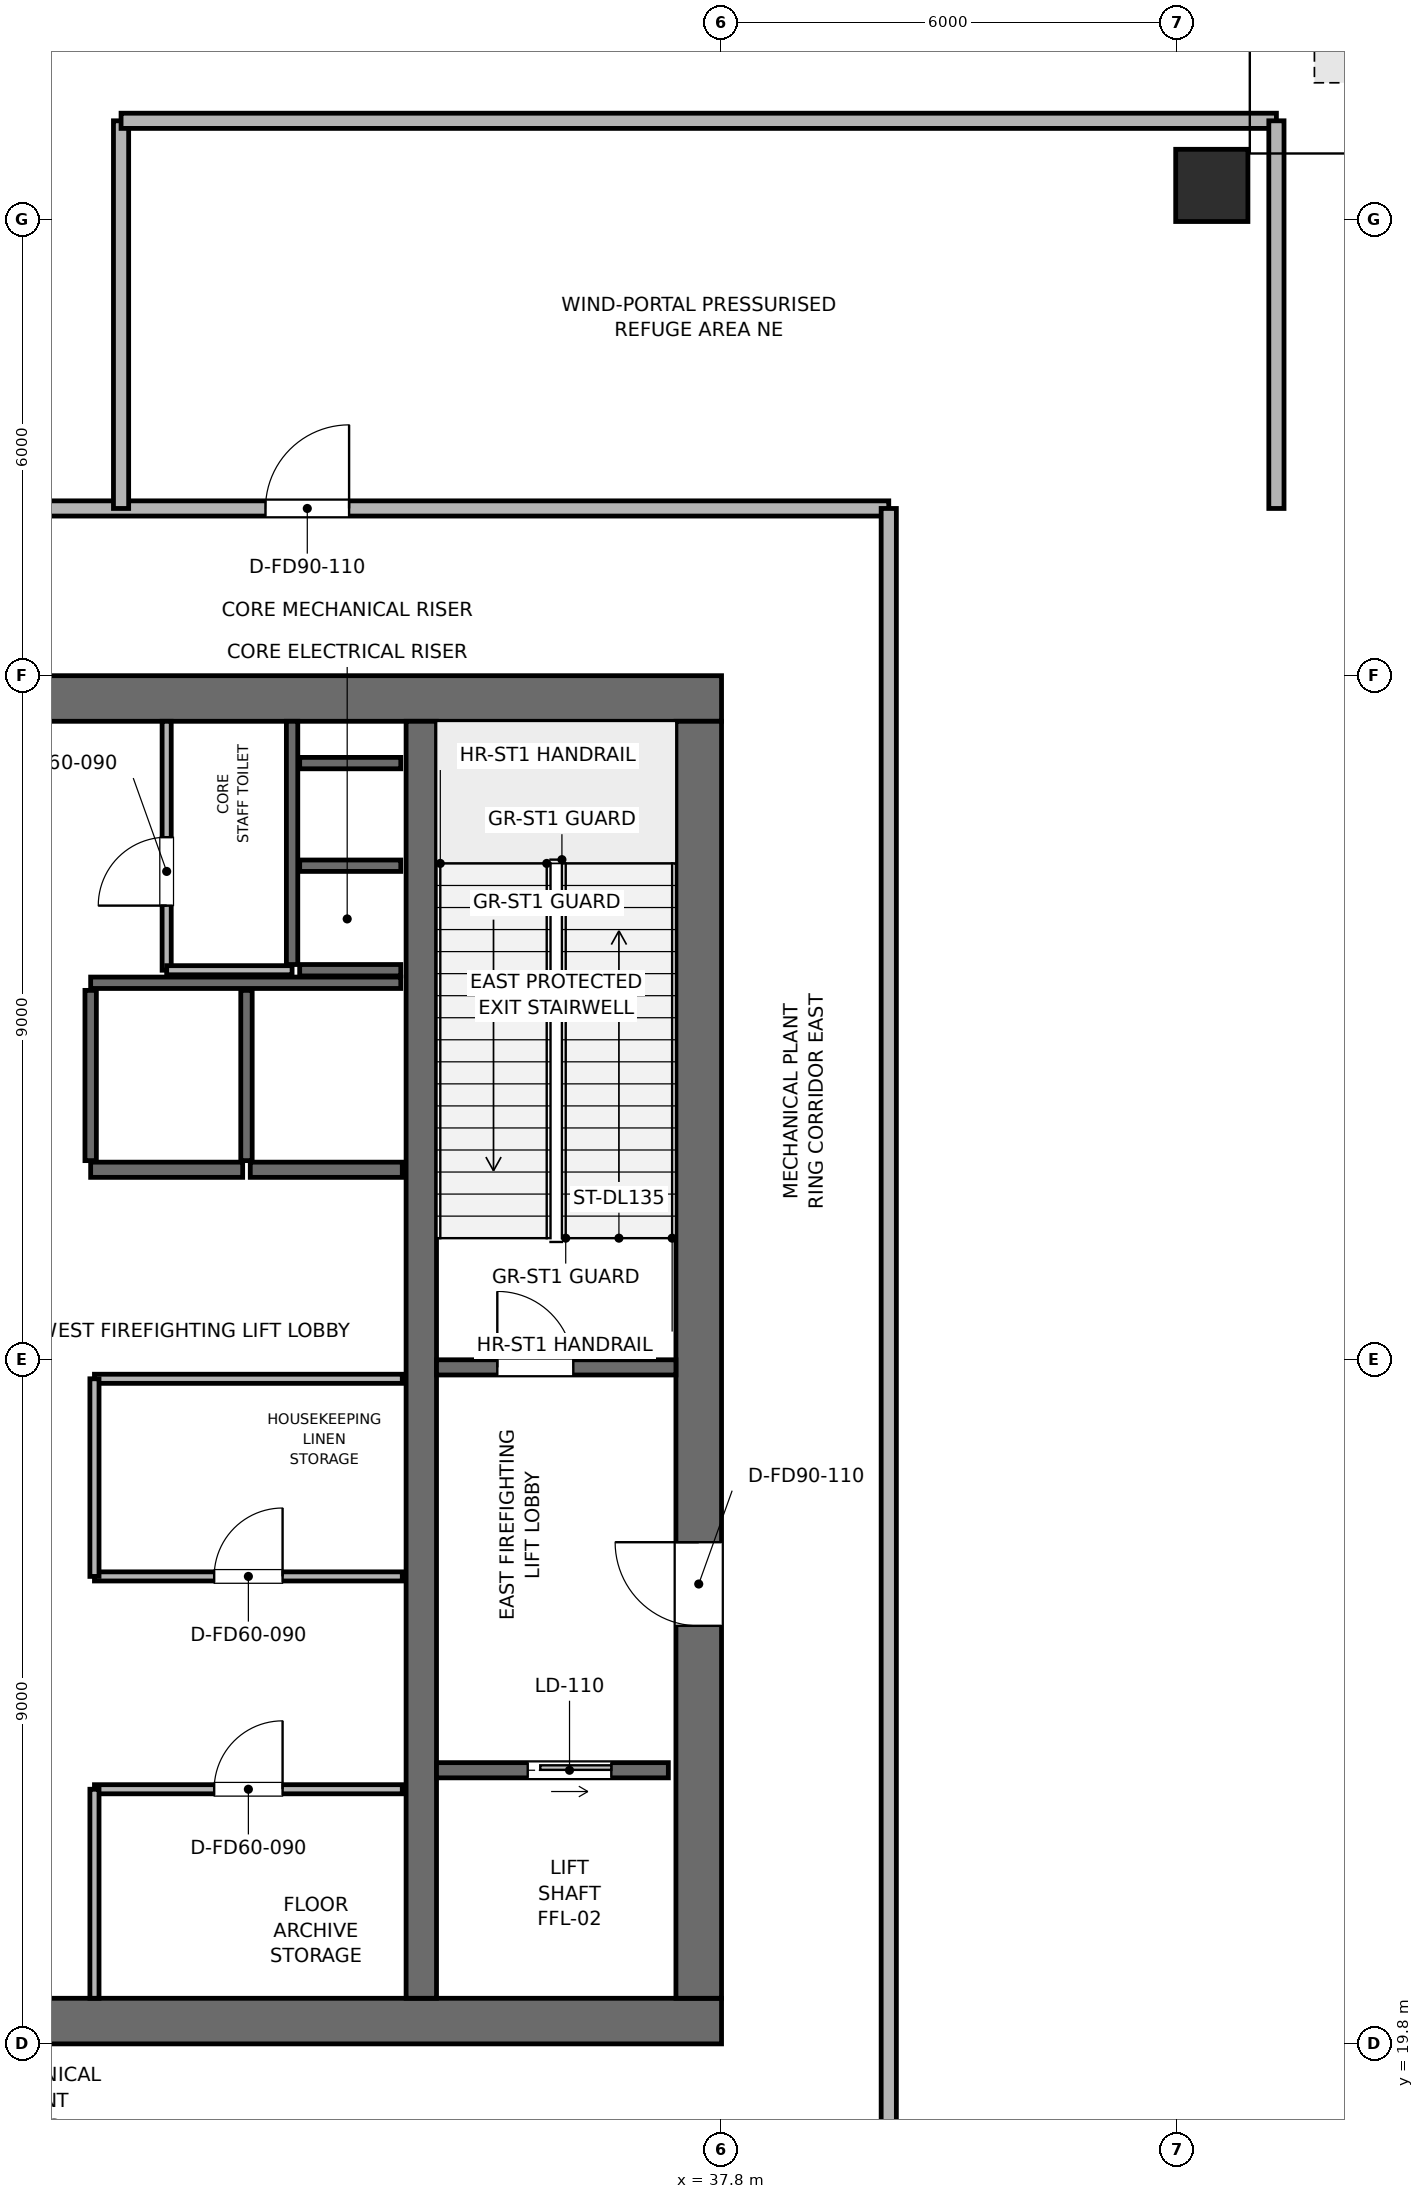
"""IFC4 building model, lengths in metres.
Left out: names, types, materials, properties, quantities, classifications, styles, units other than length and angle.
Written with IfcOpenShell. Run it as: python <this file> out.ifc"""

import sys

from ifc_helpers import new_model, si_unit, direction, frame, frame_2d, origin, origin_2d, place, context, subcontext, project, spatial, rectangle, extrude, element, fill, save


model = new_model("IFC4")
c1 = context("Model", 3, precision=1e-05, world=origin(), true_north=direction((0.0, 1.0)))
c2 = subcontext(c1, "Body", "Model", "MODEL_VIEW")
j1 = project(units=[si_unit("LENGTHUNIT", "METRE"), si_unit("PLANEANGLEUNIT", "RADIAN")], contexts=[c1])
p1 = place(None, origin())
s1 = spatial("IfcSite", under=j1, at=p1, CompositionType="ELEMENT")
p2 = place(p1, origin())
s2 = spatial("IfcBuilding", under=s1, at=p2, CompositionType="ELEMENT")
p3 = place(p2, frame((0.0, 0.0, 289.5)))
s3 = spatial("IfcBuildingStorey", under=s2, at=p3, CompositionType="ELEMENT", Elevation=289.5)
p4 = place(p3, frame((19.8, 20.1, 0.0), z_axis=(0.0, 0.0, 1.0), x_axis=(1.0, 0.0, 0.0)))
e1 = element("IfcWall", 1, at=p4, inside=s3, PredefinedType="SHEAR", context=c2, shape_type="SweptSolid", body=[
    extrude(rectangle(XDim=18.0, YDim=0.6, at=frame_2d((9.0, 0.0))), origin(), (0.0, 0.0, 1.0), 6.0),
])
p5 = place(p3, frame((19.8, 37.5, 0.0), z_axis=(0.0, 0.0, 1.0), x_axis=(1.0, 0.0, 0.0)))
e2 = element("IfcWall", 2, at=p5, inside=s3, PredefinedType="SHEAR", context=c2, shape_type="SweptSolid", body=[
    extrude(rectangle(XDim=18.0, YDim=0.6, at=frame_2d((9.0, 0.0))), origin(), (0.0, 0.0, 1.0), 6.0),
])
p6 = place(p5, frame((7.05, 0.0, 0.0)))
e3 = element("IfcOpeningElement", 3, at=p6, cuts=e2, PredefinedType="OPENING", context=c2, shape_type="SweptSolid", body=[
    extrude(rectangle(XDim=1.1, YDim=2.15, at=frame_2d((0.55, 1.075))), frame((0.0, 0.31, 0.0), z_axis=(0.0, -1.0, 0.0), x_axis=(1.0, 0.0, 0.0)), (0.0, 0.0, 1.0), 0.62),
])
p7 = place(p3, frame((37.5, 20.4, 0.0), z_axis=(0.0, 0.0, 1.0), x_axis=(0.0, 1.0, 0.0)))
e4 = element("IfcWall", 4, at=p7, inside=s3, PredefinedType="SHEAR", context=c2, shape_type="SweptSolid", body=[
    extrude(rectangle(XDim=16.8, YDim=0.6, at=frame_2d((8.4, 0.0))), origin(), (0.0, 0.0, 1.0), 6.0),
])
p8 = place(p7, frame((4.9, 0.0, 0.0)))
e5 = element("IfcOpeningElement", 5, at=p8, cuts=e4, PredefinedType="OPENING", context=c2, shape_type="SweptSolid", body=[
    extrude(rectangle(XDim=1.1, YDim=2.15, at=frame_2d((0.55, 1.075))), frame((0.0, 0.31, 0.0), z_axis=(0.0, -1.0, 0.0), x_axis=(1.0, 0.0, 0.0)), (0.0, 0.0, 1.0), 0.62),
])
p9 = place(p3, frame((33.85, 20.4, 0.0), z_axis=(0.0, 0.0, 1.0), x_axis=(0.0, 1.0, 0.0)))
e6 = element("IfcWall", 6, at=p9, inside=s3, PredefinedType="SHEAR", context=c2, shape_type="SweptSolid", body=[
    extrude(rectangle(XDim=16.8, YDim=0.4, at=frame_2d((8.4, 0.0))), origin(), (0.0, 0.0, 1.0), 6.0),
])
p10 = place(p3, frame((44.25, 44.25, 0.003), z_axis=(-0.049940740348, -0.049940740348, 0.997502804461), x_axis=(0.707106781187, -0.707106781187, 0.0)))
e7 = element("IfcColumn", 7, at=p10, inside=s3, PredefinedType="COLUMN", context=c2, shape_type="SweptSolid", body=[
    extrude(rectangle(XDim=0.95, YDim=0.95, at=origin_2d()), origin(), (0.0, 0.0, 1.0), 5.769),
])
p11 = place(p3, frame((34.05, 28.7, 0.0), z_axis=(0.0, 0.0, 1.0), x_axis=(1.0, 0.0, 0.0)))
e8 = element("IfcWall", 8, at=p11, inside=s3, PredefinedType="SHEAR", context=c2, shape_type="SweptSolid", body=[
    extrude(rectangle(XDim=3.15, YDim=0.2, at=frame_2d((1.575, 0.0))), origin(), (0.0, 0.0, 1.0), 5.76),
])
p12 = place(p11, frame((0.8, 0.0, 0.0)))
e9 = element("IfcOpeningElement", 9, at=p12, cuts=e8, PredefinedType="OPENING", context=c2, shape_type="SweptSolid", body=[
    extrude(rectangle(XDim=1.0, YDim=2.1, at=frame_2d((0.5, 1.05))), frame((0.0, 0.11, 0.0), z_axis=(0.0, -1.0, 0.0), x_axis=(1.0, 0.0, 0.0)), (0.0, 0.0, 1.0), 0.22),
])
p13 = place(p3, frame((32.15, 34.0, 0.0), z_axis=(0.0, 0.0, 1.0), x_axis=(0.0, 1.0, 0.0)))
e10 = element("IfcWall", 10, at=p13, inside=s3, PredefinedType="SHEAR", context=c2, shape_type="SweptSolid", body=[
    extrude(rectangle(XDim=3.2, YDim=0.15, at=frame_2d((1.6, 0.0))), origin(), (0.0, 0.0, 1.0), 5.76),
])
for number, where, z_axis, x_axis in (
    (11, (32.25, 33.925, 0.0), (0.0, 0.0, 1.0), (1.0, 0.0, 0.0)),
    (12, (32.25, 35.3, 0.0), (0.0, 0.0, 1.0), (1.0, 0.0, 0.0)),
):
    element("IfcWall", number, at=place(p3, frame(where, z_axis=z_axis, x_axis=x_axis)), inside=s3, PredefinedType="SHEAR", context=c2, shape_type="SweptSolid", body=[
        extrude(rectangle(XDim=1.33, YDim=0.15, at=frame_2d((0.665, 0.0))), origin(), (0.0, 0.0, 1.0), 5.76),
    ])
p14 = place(p3, frame((34.05, 23.4, 0.0), z_axis=(0.0, 0.0, 1.0), x_axis=(1.0, 0.0, 0.0)))
e13 = element("IfcWall", 13, at=p14, inside=s3, PredefinedType="SHEAR", context=c2, shape_type="SweptSolid", body=[
    extrude(rectangle(XDim=3.05, YDim=0.2, at=frame_2d((1.525, 0.0))), origin(), (0.0, 0.0, 1.0), 5.76),
])
p15 = place(p14, frame((1.2, 0.0, 0.0)))
e14 = element("IfcOpeningElement", 14, at=p15, cuts=e13, PredefinedType="OPENING", context=c2, shape_type="SweptSolid", body=[
    extrude(rectangle(XDim=1.1, YDim=2.15, at=frame_2d((0.55, 1.075))), frame((0.0, 0.11, 0.0), z_axis=(0.0, -1.0, 0.0), x_axis=(1.0, 0.0, 0.0)), (0.0, 0.0, 1.0), 0.22),
])
for number, where, z_axis, x_axis in (
    (15, (29.5, 31.3, 0.0), (0.0, 0.0, 1.0), (1.0, 0.0, 0.0)),
    (16, (31.6, 31.3, 0.0), (0.0, 0.0, 1.0), (1.0, 0.0, 0.0)),
):
    element("IfcWall", number, at=place(p3, frame(where, z_axis=z_axis, x_axis=x_axis)), inside=s3, PredefinedType="SHEAR", context=c2, shape_type="SweptSolid", body=[
        extrude(rectangle(XDim=2.0, YDim=0.2, at=frame_2d((1.0, 0.0))), origin(), (0.0, 0.0, 1.0), 5.76),
    ])
p16 = place(p3, frame((32.25, 36.65, 0.0), z_axis=(0.0, 0.0, 1.0), x_axis=(1.0, 0.0, 0.0)))
e17 = element("IfcWall", 17, at=p16, inside=s3, PredefinedType="SHEAR", context=c2, shape_type="SweptSolid", body=[
    extrude(rectangle(XDim=1.33, YDim=0.15, at=frame_2d((0.665, 0.0))), origin(), (0.0, 0.0, 1.0), 5.76),
])
p17 = place(p3, frame((29.5, 33.76, 0.0), z_axis=(0.0, 0.0, 1.0), x_axis=(1.0, 0.0, 0.0)))
e18 = element("IfcWall", 18, at=p17, inside=s3, PredefinedType="SHEAR", context=c2, shape_type="SweptSolid", body=[
    extrude(rectangle(XDim=4.08, YDim=0.15, at=frame_2d((2.04, 0.0))), origin(), (0.0, 0.0, 1.0), 5.76),
])
for number, where, z_axis, x_axis in (
    (19, (29.5, 31.42, 0.0), (0.0, 0.0, 1.0), (0.0, 1.0, 0.0)),
    (20, (31.55, 31.42, 0.0), (0.0, 0.0, 1.0), (0.0, 1.0, 0.0)),
):
    element("IfcWall", number, at=place(p3, frame(where, z_axis=z_axis, x_axis=x_axis)), inside=s3, PredefinedType="SHEAR", context=c2, shape_type="SweptSolid", body=[
        extrude(rectangle(XDim=2.24, YDim=0.15, at=frame_2d((1.12, 0.0))), origin(), (0.0, 0.0, 1.0), 5.76),
    ])
p18 = place(p3, frame((30.5, 33.925, 0.0), z_axis=(0.0, 0.0, 1.0), x_axis=(0.0, 1.0, 0.0)))
e21 = element("IfcWall", 21, at=p18, inside=s3, PredefinedType="PARTITIONING", context=c2, shape_type="SweptSolid", body=[
    extrude(rectangle(XDim=3.275, YDim=0.12, at=frame_2d((1.637, 0.0))), origin(), (0.0, 0.0, 1.0), 5.76),
])
p19 = place(p18, frame((0.85, 0.0, 0.0)))
e22 = element("IfcOpeningElement", 22, at=p19, cuts=e21, PredefinedType="OPENING", context=c2, shape_type="SweptSolid", body=[
    extrude(rectangle(XDim=0.9, YDim=2.1, at=frame_2d((0.45, 1.05))), frame((0.0, 0.07, 0.0), z_axis=(0.0, -1.0, 0.0), x_axis=(1.0, 0.0, 0.0)), (0.0, 0.0, 1.0), 0.14),
])
p20 = place(p3, frame((30.5, 33.925, 0.0), z_axis=(0.0, 0.0, 1.0), x_axis=(1.0, 0.0, 0.0)))
e23 = element("IfcWall", 23, at=p20, inside=s3, PredefinedType="PARTITIONING", context=c2, shape_type="SweptSolid", body=[
    extrude(rectangle(XDim=1.65, YDim=0.12, at=frame_2d((0.825, 0.0))), origin(), (0.0, 0.0, 1.0), 5.76),
])
p21 = place(p3, frame((29.55, 23.15, 0.0), z_axis=(0.0, 0.0, 1.0), x_axis=(1.0, 0.0, 0.0)))
e24 = element("IfcWall", 24, at=p21, inside=s3, PredefinedType="PARTITIONING", context=c2, shape_type="SweptSolid", body=[
    extrude(rectangle(XDim=4.05, YDim=0.12, at=frame_2d((2.025, 0.0))), origin(), (0.0, 0.0, 1.0), 5.76),
])
p22 = place(p21, frame((1.575, 0.0, 0.0)))
e25 = element("IfcOpeningElement", 25, at=p22, cuts=e24, PredefinedType="OPENING", context=c2, shape_type="SweptSolid", body=[
    extrude(rectangle(XDim=0.9, YDim=2.1, at=frame_2d((0.45, 1.05))), frame((0.0, 0.07, 0.0), z_axis=(0.0, -1.0, 0.0), x_axis=(1.0, 0.0, 0.0)), (0.0, 0.0, 1.0), 0.14),
])
p23 = place(p3, frame((29.55, 20.4, 0.0), z_axis=(0.0, 0.0, 1.0), x_axis=(0.0, 1.0, 0.0)))
e26 = element("IfcWall", 26, at=p23, inside=s3, PredefinedType="PARTITIONING", context=c2, shape_type="SweptSolid", body=[
    extrude(rectangle(XDim=2.75, YDim=0.12, at=frame_2d((1.375, 0.0))), origin(), (0.0, 0.0, 1.0), 5.76),
])
p24 = place(p3, frame((29.55, 25.95, 0.0), z_axis=(0.0, 0.0, 1.0), x_axis=(1.0, 0.0, 0.0)))
e27 = element("IfcWall", 27, at=p24, inside=s3, PredefinedType="PARTITIONING", context=c2, shape_type="SweptSolid", body=[
    extrude(rectangle(XDim=4.05, YDim=0.12, at=frame_2d((2.025, 0.0))), origin(), (0.0, 0.0, 1.0), 5.76),
])
p25 = place(p24, frame((1.575, 0.0, 0.0)))
e28 = element("IfcOpeningElement", 28, at=p25, cuts=e27, PredefinedType="OPENING", context=c2, shape_type="SweptSolid", body=[
    extrude(rectangle(XDim=0.9, YDim=2.1, at=frame_2d((0.45, 1.05))), frame((0.0, 0.07, 0.0), z_axis=(0.0, -1.0, 0.0), x_axis=(1.0, 0.0, 0.0)), (0.0, 0.0, 1.0), 0.14),
])
p26 = place(p3, frame((29.55, 28.55, 0.0), z_axis=(0.0, 0.0, 1.0), x_axis=(1.0, 0.0, 0.0)))
e29 = element("IfcWall", 29, at=p26, inside=s3, PredefinedType="PARTITIONING", context=c2, shape_type="SweptSolid", body=[
    extrude(rectangle(XDim=4.05, YDim=0.12, at=frame_2d((2.025, 0.0))), origin(), (0.0, 0.0, 1.0), 5.76),
])
p27 = place(p3, frame((29.55, 25.95, 0.0), z_axis=(0.0, 0.0, 1.0), x_axis=(0.0, 1.0, 0.0)))
e30 = element("IfcWall", 30, at=p27, inside=s3, PredefinedType="PARTITIONING", context=c2, shape_type="SweptSolid", body=[
    extrude(rectangle(XDim=2.6, YDim=0.12, at=frame_2d((1.3, 0.0))), origin(), (0.0, 0.0, 1.0), 5.76),
])
p28 = place(p3, frame((17.6, 40.0, 0.0), z_axis=(0.0, 0.0, 1.0), x_axis=(1.0, 0.0, 0.0)))
e31 = element("IfcWall", 31, at=p28, inside=s3, PredefinedType="PARTITIONING", context=c2, shape_type="SweptSolid", body=[
    extrude(rectangle(XDim=22.4, YDim=0.2, at=frame_2d((11.2, 0.0))), origin(), (0.0, 0.0, 1.0), 5.345),
])
p29 = place(p28, frame((14.2, 0.0, 0.0)))
e32 = element("IfcOpeningElement", 32, at=p29, cuts=e31, PredefinedType="OPENING", context=c2, shape_type="SweptSolid", body=[
    extrude(rectangle(XDim=1.1, YDim=2.15, at=frame_2d((0.55, 1.075))), frame((0.0, 0.11, 0.0), z_axis=(0.0, -1.0, 0.0), x_axis=(1.0, 0.0, 0.0)), (0.0, 0.0, 1.0), 0.22),
])
p30 = place(p3, frame((40.0, 17.6, 0.0), z_axis=(0.0, 0.0, 1.0), x_axis=(0.0, 1.0, 0.0)))
e33 = element("IfcWall", 33, at=p30, inside=s3, PredefinedType="PARTITIONING", context=c2, shape_type="SweptSolid", body=[
    extrude(rectangle(XDim=22.4, YDim=0.2, at=frame_2d((11.2, 0.0))), origin(), (0.0, 0.0, 1.0), 5.345),
])
p31 = place(p3, frame((29.9, 40.0, 0.0), z_axis=(0.0, 0.0, 1.0), x_axis=(0.0, 1.0, 0.0)))
e34 = element("IfcWall", 34, at=p31, inside=s3, PredefinedType="PARTITIONING", context=c2, shape_type="SweptSolid", body=[
    extrude(rectangle(XDim=5.1, YDim=0.2, at=frame_2d((2.55, 0.0))), origin(), (0.0, 0.0, 1.0), 5.385),
])
p32 = place(p3, frame((29.9, 45.1, 0.0), z_axis=(0.0, 0.0, 1.0), x_axis=(1.0, 0.0, 0.0)))
e35 = element("IfcWall", 35, at=p32, inside=s3, PredefinedType="PARTITIONING", context=c2, shape_type="SweptSolid", body=[
    extrude(rectangle(XDim=15.2, YDim=0.2, at=frame_2d((7.6, 0.0))), origin(), (0.0, 0.0, 1.0), 5.345),
])
p33 = place(p3, frame((45.1, 40.0, 0.0), z_axis=(0.0, 0.0, 1.0), x_axis=(0.0, 1.0, 0.0)))
e36 = element("IfcWall", 36, at=p33, inside=s3, PredefinedType="PARTITIONING", context=c2, shape_type="SweptSolid", body=[
    extrude(rectangle(XDim=5.1, YDim=0.2, at=frame_2d((2.55, 0.0))), origin(), (0.0, 0.0, 1.0), 5.445),
])
p34 = place(p12, origin())
e37 = element("IfcDoor", 37, at=p34, inside=s3, OperationType="SINGLE_SWING_LEFT", PredefinedType="DOOR", context=c2, shape_type="SweptSolid", body=[
    extrude(rectangle(XDim=1.0, YDim=2.1, at=frame_2d((0.5, 1.05))), frame((0.0, 0.025, 0.0), z_axis=(0.0, -1.0, 0.0), x_axis=(1.0, 0.0, 0.0)), (0.0, 0.0, 1.0), 0.05),
])
fill(e9, e37)
p35 = place(p15, origin())
e38 = element("IfcDoor", 38, at=p35, inside=s3, OperationType="SLIDING_TO_RIGHT", PredefinedType="DOOR", context=c2, shape_type="SweptSolid", body=[
    extrude(rectangle(XDim=1.1, YDim=2.15, at=frame_2d((0.55, 1.075))), frame((0.0, 0.025, 0.0), z_axis=(0.0, -1.0, 0.0), x_axis=(1.0, 0.0, 0.0)), (0.0, 0.0, 1.0), 0.05),
])
fill(e14, e38)
p36 = place(p19, origin())
e39 = element("IfcDoor", 39, at=p36, inside=s3, OperationType="SINGLE_SWING_LEFT", PredefinedType="DOOR", context=c2, shape_type="SweptSolid", body=[
    extrude(rectangle(XDim=0.9, YDim=2.1, at=frame_2d((0.45, 1.05))), frame((0.0, 0.025, 0.0), z_axis=(0.0, -1.0, 0.0), x_axis=(1.0, 0.0, 0.0)), (0.0, 0.0, 1.0), 0.05),
])
fill(e22, e39)
p37 = place(p22, origin())
e40 = element("IfcDoor", 40, at=p37, inside=s3, OperationType="SINGLE_SWING_RIGHT", PredefinedType="DOOR", context=c2, shape_type="SweptSolid", body=[
    extrude(rectangle(XDim=0.9, YDim=2.1, at=frame_2d((0.45, 1.05))), frame((0.0, 0.025, 0.0), z_axis=(0.0, -1.0, 0.0), x_axis=(1.0, 0.0, 0.0)), (0.0, 0.0, 1.0), 0.05),
])
fill(e25, e40)
p38 = place(p25, origin())
e41 = element("IfcDoor", 41, at=p38, inside=s3, OperationType="SINGLE_SWING_RIGHT", PredefinedType="DOOR", context=c2, shape_type="SweptSolid", body=[
    extrude(rectangle(XDim=0.9, YDim=2.1, at=frame_2d((0.45, 1.05))), frame((0.0, 0.025, 0.0), z_axis=(0.0, -1.0, 0.0), x_axis=(1.0, 0.0, 0.0)), (0.0, 0.0, 1.0), 0.05),
])
fill(e28, e41)
p39 = place(p29, origin())
e42 = element("IfcDoor", 42, at=p39, inside=s3, OperationType="SINGLE_SWING_RIGHT", PredefinedType="DOOR", context=c2, shape_type="SweptSolid", body=[
    extrude(rectangle(XDim=1.1, YDim=2.15, at=frame_2d((0.55, 1.075))), frame((0.0, 0.025, 0.0), z_axis=(0.0, -1.0, 0.0), x_axis=(1.0, 0.0, 0.0)), (0.0, 0.0, 1.0), 0.05),
])
fill(e32, e42)
p40 = place(p8, origin())
e43 = element("IfcDoor", 43, at=p40, inside=s3, OperationType="SINGLE_SWING_RIGHT", PredefinedType="DOOR", context=c2, shape_type="SweptSolid", body=[
    extrude(rectangle(XDim=1.1, YDim=2.15, at=frame_2d((0.55, 1.075))), frame((0.0, 0.025, 0.0), z_axis=(0.0, -1.0, 0.0), x_axis=(1.0, 0.0, 0.0)), (0.0, 0.0, 1.0), 0.05),
])
fill(e5, e43)
save(model, sys.argv[1])
